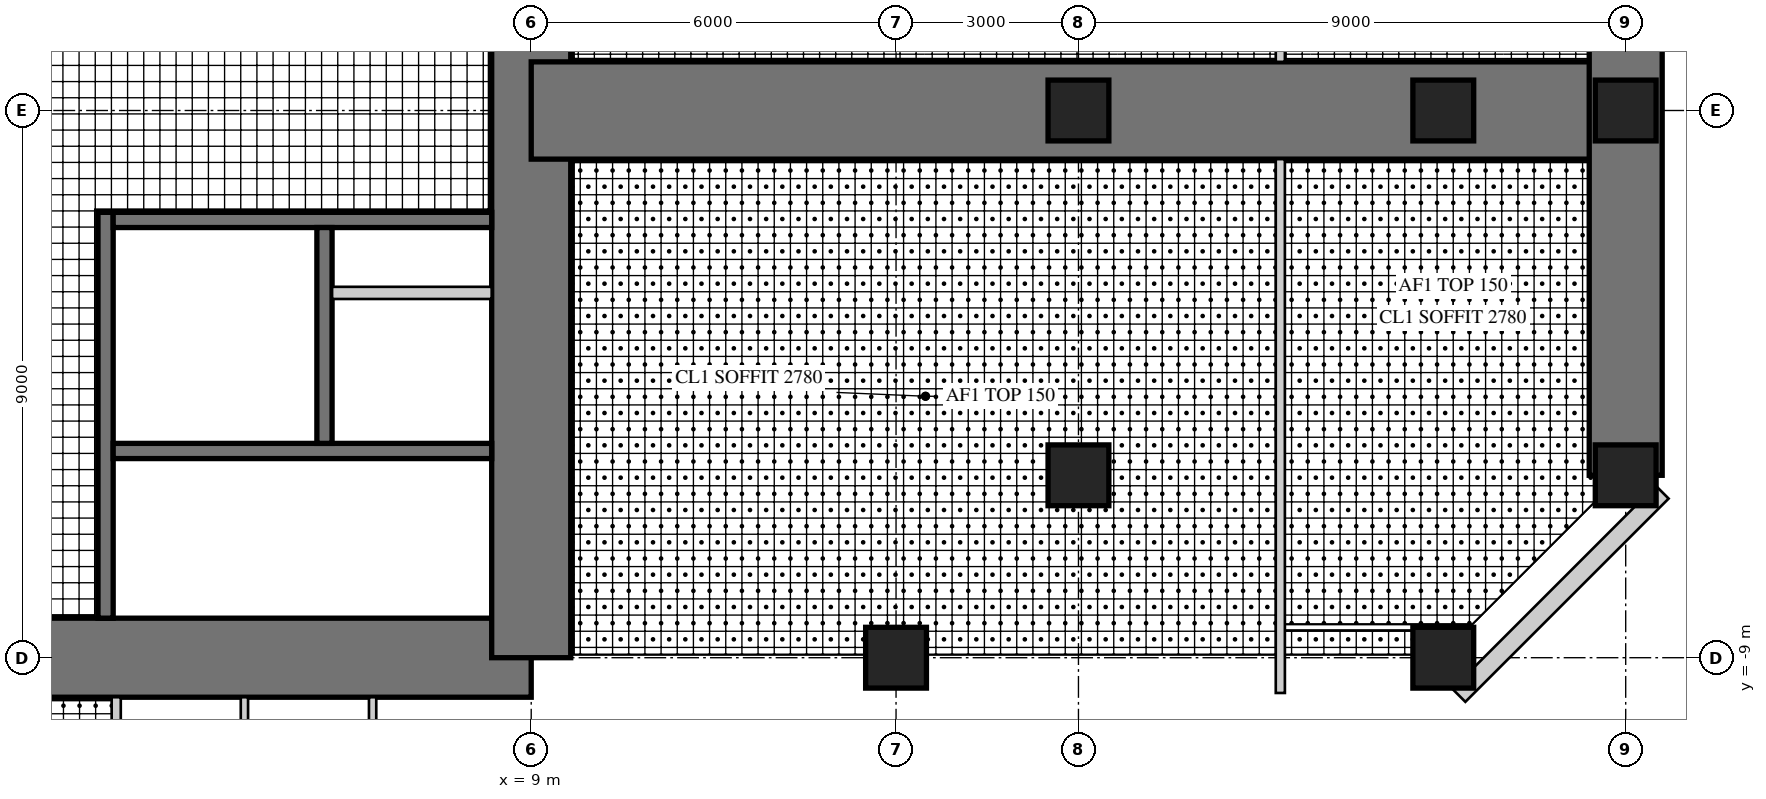
"""IFC4 building model, lengths in metres.
Left out: names, types, materials, properties, quantities, classifications, styles, units other than length and angle.
Written with IfcOpenShell. Run it as: python <this file> out.ifc"""

import sys

from ifc_helpers import new_model, si_unit, direction, frame, frame_2d, origin, origin_2d, place, context, subcontext, project, spatial, rectangle, hollow_rectangle, extrude, element, fill, save


model = new_model("IFC4")
c1 = context("Model", 3, precision=1e-05, world=origin(), true_north=direction((0.0, 1.0)))
c2 = subcontext(c1, "Body", "Model", "MODEL_VIEW")
j1 = project(units=[si_unit("LENGTHUNIT", "METRE"), si_unit("PLANEANGLEUNIT", "RADIAN")], contexts=[c1])
p1 = place(None, origin())
s1 = spatial("IfcSite", under=j1, at=p1, CompositionType="ELEMENT")
p2 = place(p1, origin())
s2 = spatial("IfcBuilding", under=s1, at=p2, CompositionType="ELEMENT")
p3 = place(p2, frame((0.0, 0.0, 144.5)))
s3 = spatial("IfcBuildingStorey", under=s2, at=p3, CompositionType="ELEMENT", Elevation=144.5)
p4 = place(p3, frame((-9.0, -9.0, 0.0), z_axis=(0.0, 0.0, 1.0), x_axis=(1.0, 0.0, 0.0)))
e1 = element("IfcWall", 1, at=p4, inside=s3, PredefinedType="SHEAR", context=c2, shape_type="SweptSolid", body=[
    extrude(rectangle(XDim=18.0, YDim=1.3, at=frame_2d((9.0, 0.0))), origin(), (0.0, 0.0, 1.0), 4.0),
])
p5 = place(p4, frame((9.8, 0.0, 0.0)))
e2 = element("IfcOpeningElement", 2, at=p5, cuts=e1, PredefinedType="OPENING", context=c2, shape_type="SweptSolid", body=[
    extrude(rectangle(XDim=1.0, YDim=2.4, at=frame_2d((0.5, 1.2))), frame((0.0, 0.66, 0.0), z_axis=(0.0, -1.0, 0.0), x_axis=(1.0, 0.0, 0.0)), (0.0, 0.0, 1.0), 1.32),
])
p6 = place(p3, frame((9.0, -9.0, 0.0), z_axis=(0.0, 0.0, 1.0), x_axis=(0.0, 1.0, 0.0)))
e3 = element("IfcWall", 3, at=p6, inside=s3, PredefinedType="SHEAR", context=c2, shape_type="SweptSolid", body=[
    extrude(rectangle(XDim=18.0, YDim=1.3, at=frame_2d((9.0, 0.0))), origin(), (0.0, 0.0, 1.0), 4.0),
])
p7 = place(p6, frame((9.8, 0.0, 0.0)))
e4 = element("IfcOpeningElement", 4, at=p7, cuts=e3, PredefinedType="OPENING", context=c2, shape_type="SweptSolid", body=[
    extrude(rectangle(XDim=1.0, YDim=2.4, at=frame_2d((0.5, 1.2))), frame((0.0, 0.66, 0.0), z_axis=(0.0, -1.0, 0.0), x_axis=(1.0, 0.0, 0.0)), (0.0, 0.0, 1.0), 1.32),
])
p8 = place(p3, frame((2.0, -1.675, 0.0), z_axis=(0.0, 0.0, 1.0), x_axis=(0.0, -1.0, 0.0)))
e5 = element("IfcWall", 5, at=p8, inside=s3, PredefinedType="SHEAR", context=c2, shape_type="SweptSolid", body=[
    extrude(rectangle(XDim=6.675, YDim=0.25, at=frame_2d((3.337, 0.0))), origin(), (0.0, 0.0, 1.0), 4.0),
])
p9 = place(p8, frame((0.725, 0.0, 0.0)))
e6 = element("IfcOpeningElement", 6, at=p9, cuts=e5, PredefinedType="OPENING", context=c2, shape_type="SweptSolid", body=[
    extrude(rectangle(XDim=1.0, YDim=2.1, at=frame_2d((0.5, 1.05))), frame((0.0, 0.135, 0.0), z_axis=(0.0, -1.0, 0.0), x_axis=(1.0, 0.0, 0.0)), (0.0, 0.0, 1.0), 0.27),
])
p10 = place(p3, frame((2.125, -1.8, 0.0), z_axis=(0.0, 0.0, 1.0), x_axis=(1.0, 0.0, 0.0)))
e7 = element("IfcWall", 7, at=p10, inside=s3, PredefinedType="SHEAR", context=c2, shape_type="SweptSolid", body=[
    extrude(rectangle(XDim=6.225, YDim=0.25, at=frame_2d((3.113, 0.0))), origin(), (0.0, 0.0, 1.0), 4.0),
])
p11 = place(p3, frame((2.125, -5.6, 0.0), z_axis=(0.0, 0.0, 1.0), x_axis=(1.0, 0.0, 0.0)))
e8 = element("IfcWall", 8, at=p11, inside=s3, PredefinedType="SHEAR", context=c2, shape_type="SweptSolid", body=[
    extrude(rectangle(XDim=6.225, YDim=0.25, at=frame_2d((3.113, 0.0))), origin(), (0.0, 0.0, 1.0), 4.0),
])
p12 = place(p11, frame((0.175, 0.0, 0.0)))
e9 = element("IfcOpeningElement", 9, at=p12, cuts=e8, PredefinedType="OPENING", context=c2, shape_type="SweptSolid", body=[
    extrude(rectangle(XDim=1.0, YDim=2.1, at=frame_2d((0.5, 1.05))), frame((0.0, 0.135, 0.0), z_axis=(0.0, -1.0, 0.0), x_axis=(1.0, 0.0, 0.0)), (0.0, 0.0, 1.0), 0.27),
])
p13 = place(p3, frame((5.6, -1.925, 0.0), z_axis=(0.0, 0.0, 1.0), x_axis=(0.0, -1.0, 0.0)))
e10 = element("IfcWall", 10, at=p13, inside=s3, PredefinedType="SHEAR", context=c2, shape_type="SweptSolid", body=[
    extrude(rectangle(XDim=3.55, YDim=0.25, at=frame_2d((1.775, 0.0))), origin(), (0.0, 0.0, 1.0), 4.0),
])
p14 = place(p13, frame((1.525, 0.0, 0.0)))
e11 = element("IfcOpeningElement", 11, at=p14, cuts=e10, PredefinedType="OPENING", context=c2, shape_type="SweptSolid", body=[
    extrude(rectangle(XDim=1.1, YDim=2.2, at=frame_2d((0.55, 1.1))), frame((0.0, 0.135, 0.0), z_axis=(0.0, -1.0, 0.0), x_axis=(1.0, 0.0, 0.0)), (0.0, 0.0, 1.0), 0.27),
])
p15 = place(p13, frame((0.075, 0.0, 0.0)))
e12 = element("IfcOpeningElement", 12, at=p15, cuts=e10, PredefinedType="OPENING", context=c2, shape_type="SweptSolid", body=[
    extrude(rectangle(XDim=0.8, YDim=2.1, at=frame_2d((0.4, 1.05))), frame((0.0, 0.135, 0.0), z_axis=(0.0, -1.0, 0.0), x_axis=(1.0, 0.0, 0.0)), (0.0, 0.0, 1.0), 0.27),
])
p16 = place(p3, frame((5.725, -3.0, 0.0), z_axis=(0.0, 0.0, 1.0), x_axis=(1.0, 0.0, 0.0)))
e13 = element("IfcWall", 13, at=p16, inside=s3, PredefinedType="PARTITIONING", context=c2, shape_type="SweptSolid", body=[
    extrude(rectangle(XDim=2.625, YDim=0.2, at=frame_2d((1.312, 0.0))), origin(), (0.0, 0.0, 1.0), 4.0),
])
p17 = place(p3, frame((9.0, 0.0, 0.0), z_axis=(0.0, 0.0, 1.0), x_axis=(1.0, 0.0, 0.0)))
e14 = element("IfcWall", 14, at=p17, inside=s3, PredefinedType="SHEAR", context=c2, shape_type="SweptSolid", body=[
    extrude(rectangle(XDim=18.0, YDim=1.6, at=frame_2d((9.0, 0.0))), origin(), (0.0, 0.0, 1.0), 4.0),
])
p18 = place(p17, frame((9.8, 0.0, 0.0)))
e15 = element("IfcOpeningElement", 15, at=p18, cuts=e14, PredefinedType="OPENING", context=c2, shape_type="SweptSolid", body=[
    extrude(rectangle(XDim=1.0, YDim=2.2, at=frame_2d((0.5, 1.1))), frame((0.0, 0.81, 0.0), z_axis=(0.0, -1.0, 0.0), x_axis=(1.0, 0.0, 0.0)), (0.0, 0.0, 1.0), 1.62),
])
p19 = place(p3, frame((27.0, -6.0, 0.0), z_axis=(0.0, 0.0, 1.0), x_axis=(0.0, 1.0, 0.0)))
e16 = element("IfcWall", 16, at=p19, inside=s3, PredefinedType="SHEAR", context=c2, shape_type="SweptSolid", body=[
    extrude(rectangle(XDim=12.0, YDim=1.2, at=frame_2d((6.0, 0.0))), origin(), (0.0, 0.0, 1.0), 4.0),
])
p20 = place(p19, frame((1.45, 0.0, 0.6)))
e17 = element("IfcOpeningElement", 17, at=p20, cuts=e16, PredefinedType="OPENING", context=c2, shape_type="SweptSolid", body=[
    extrude(rectangle(XDim=3.0, YDim=2.4, at=frame_2d((1.5, 1.2))), frame((0.0, 0.61, 0.0), z_axis=(0.0, -1.0, 0.0), x_axis=(1.0, 0.0, 0.0)), (0.0, 0.0, 1.0), 1.22),
])
p21 = place(p19, frame((7.55, 0.0, 0.6)))
e18 = element("IfcOpeningElement", 18, at=p21, cuts=e16, PredefinedType="OPENING", context=c2, shape_type="SweptSolid", body=[
    extrude(rectangle(XDim=3.0, YDim=2.4, at=frame_2d((1.5, 1.2))), frame((0.0, 0.61, 0.0), z_axis=(0.0, -1.0, 0.0), x_axis=(1.0, 0.0, 0.0)), (0.0, 0.0, 1.0), 1.22),
])
for number, where, z_axis, x_axis in (
    (19, (15.0, -9.0, 0.0), (0.0, 0.0, 1.0), (1.0, 0.0, 0.0)),
    (20, (24.0, -9.0, 0.0), (0.0, 0.0, 1.0), (1.0, 0.0, 0.0)),
    (21, (27.0, -6.0, 0.0), (0.0, 0.0, 1.0), (1.0, 0.0, 0.0)),
    (22, (27.0, 0.0, 0.0), (0.0, 0.0, 1.0), (1.0, 0.0, 0.0)),
    (23, (18.0, -6.0, 0.0), (0.0, 0.0, 1.0), (1.0, 0.0, 0.0)),
    (24, (18.0, 0.0, 0.0), (0.0, 0.0, 1.0), (1.0, 0.0, 0.0)),
    (25, (24.0, 0.0, 0.0), (0.0, 0.0, 1.0), (1.0, 0.0, 0.0)),
):
    element("IfcColumn", number, at=place(p3, frame(where, z_axis=z_axis, x_axis=x_axis)), inside=s3, PredefinedType="COLUMN", context=c2, shape_type="SweptSolid", body=[
        extrude(rectangle(XDim=1.0, YDim=1.0, at=origin_2d()), origin(), (0.0, 0.0, 1.0), 4.0),
    ])
p22 = place(p3, frame((24.257, -9.62, 0.0), z_axis=(0.0, 0.0, 1.0), x_axis=(0.707106781187, 0.707106781187, 0.0)))
e26 = element("IfcWall", 26, at=p22, inside=s3, PredefinedType="SOLIDWALL", context=c2, shape_type="SweptSolid", body=[
    extrude(rectangle(XDim=4.728, YDim=0.3, at=frame_2d((2.364, 0.0))), origin(), (0.0, 0.0, 1.0), 3.8),
])
p23 = place(p22, frame((1.914, 0.0, 0.3)))
e27 = element("IfcOpeningElement", 27, at=p23, cuts=e26, PredefinedType="OPENING", context=c2, shape_type="SweptSolid", body=[
    extrude(rectangle(XDim=0.9, YDim=2.4, at=frame_2d((0.45, 1.2))), frame((0.0, 0.16, 0.0), z_axis=(0.0, -1.0, 0.0), x_axis=(1.0, 0.0, 0.0)), (0.0, 0.0, 1.0), 0.32),
])
p24 = place(p3, frame((21.32, 0.8, 0.0), z_axis=(0.0, 0.0, 1.0), x_axis=(0.0, 1.0, 0.0)))
e28 = element("IfcWall", 28, at=p24, inside=s3, PredefinedType="PARTITIONING", context=c2, shape_type="SweptSolid", body=[
    extrude(rectangle(XDim=8.78, YDim=0.15, at=frame_2d((4.39, 0.0))), origin(), (0.0, 0.0, 1.0), 3.8),
])
p25 = place(p24, frame((0.45, 0.0, 0.0)))
e29 = element("IfcOpeningElement", 29, at=p25, cuts=e28, PredefinedType="OPENING", context=c2, shape_type="SweptSolid", body=[
    extrude(rectangle(XDim=1.0, YDim=2.2, at=frame_2d((0.5, 1.1))), frame((0.0, 0.085, 0.0), z_axis=(0.0, -1.0, 0.0), x_axis=(1.0, 0.0, 0.0)), (0.0, 0.0, 1.0), 0.17),
])
p26 = place(p3, frame((21.32, -9.58, 0.0), z_axis=(0.0, 0.0, 1.0), x_axis=(0.0, 1.0, 0.0)))
e30 = element("IfcWall", 30, at=p26, inside=s3, PredefinedType="PARTITIONING", context=c2, shape_type="SweptSolid", body=[
    extrude(rectangle(XDim=8.78, YDim=0.15, at=frame_2d((4.39, 0.0))), origin(), (0.0, 0.0, 1.0), 3.8),
])
p27 = place(p26, frame((7.33, 0.0, 0.0)))
e31 = element("IfcOpeningElement", 31, at=p27, cuts=e30, PredefinedType="OPENING", context=c2, shape_type="SweptSolid", body=[
    extrude(rectangle(XDim=1.0, YDim=2.2, at=frame_2d((0.5, 1.1))), frame((0.0, 0.085, 0.0), z_axis=(0.0, -1.0, 0.0), x_axis=(1.0, 0.0, 0.0)), (0.0, 0.0, 1.0), 0.17),
])
p28 = place(p3, frame((2.175, -9.65, 0.0), z_axis=(0.0, 0.0, 1.0), x_axis=(0.0, -1.0, 0.0)))
e32 = element("IfcWall", 32, at=p28, inside=s3, PredefinedType="PARTITIONING", context=c2, shape_type="SweptSolid", body=[
    extrude(rectangle(XDim=5.35, YDim=0.15, at=frame_2d((2.675, 0.0))), origin(), (0.0, 0.0, 1.0), 3.8),
])
for number, where, z_axis, x_axis in (
    (33, (4.283, -9.65, 0.0), (0.0, 0.0, 1.0), (0.0, -1.0, 0.0)),
    (34, (6.392, -9.65, 0.0), (0.0, 0.0, 1.0), (0.0, -1.0, 0.0)),
):
    element("IfcWall", number, at=place(p3, frame(where, z_axis=z_axis, x_axis=x_axis)), inside=s3, PredefinedType="PLUMBINGWALL", context=c2, shape_type="SweptSolid", body=[
        extrude(rectangle(XDim=5.25, YDim=0.12, at=frame_2d((2.625, 0.0))), origin(), (0.0, 0.0, 1.0), 3.8),
    ])
p29 = place(p23, origin())
e35 = element("IfcWindow", 35, at=p29, inside=s3, PartitioningType="SINGLE_PANEL", PredefinedType="WINDOW", context=c2, shape_type="SweptSolid", body=[
    extrude(hollow_rectangle(XDim=0.9, YDim=2.4, WallThickness=0.06, at=frame_2d((0.45, 1.2))), frame((0.0, 0.03, 0.0), z_axis=(0.0, -1.0, 0.0), x_axis=(1.0, 0.0, 0.0)), (0.0, 0.0, 1.0), 0.06),
    extrude(rectangle(XDim=0.779, YDim=2.279, at=frame_2d((0.45, 1.2))), frame((0.0, 0.03, 0.0), z_axis=(0.0, -1.0, 0.0), x_axis=(1.0, 0.0, 0.0)), (0.0, 0.0, 1.0), 0.06),
])
fill(e27, e35)
p30 = place(p20, origin())
e36 = element("IfcWindow", 36, at=p30, inside=s3, PartitioningType="SINGLE_PANEL", PredefinedType="WINDOW", context=c2, shape_type="SweptSolid", body=[
    extrude(hollow_rectangle(XDim=3.0, YDim=2.4, WallThickness=0.06, at=frame_2d((1.5, 1.2))), frame((0.0, 0.03, 0.0), z_axis=(0.0, -1.0, 0.0), x_axis=(1.0, 0.0, 0.0)), (0.0, 0.0, 1.0), 0.06),
    extrude(rectangle(XDim=2.879, YDim=2.279, at=frame_2d((1.5, 1.2))), frame((0.0, 0.03, 0.0), z_axis=(0.0, -1.0, 0.0), x_axis=(1.0, 0.0, 0.0)), (0.0, 0.0, 1.0), 0.06),
])
fill(e17, e36)
p31 = place(p27, frame((1.0, 0.0, 0.0), z_axis=(0.0, 0.0, 1.0), x_axis=(-1.0, 0.0, 0.0)))
e37 = element("IfcDoor", 37, at=p31, inside=s3, OperationType="SINGLE_SWING_LEFT", PredefinedType="DOOR", context=c2, shape_type="SweptSolid", body=[
    extrude(rectangle(XDim=1.0, YDim=2.2, at=frame_2d((0.5, 1.1))), frame((0.0, 0.025, 0.0), z_axis=(0.0, -1.0, 0.0), x_axis=(1.0, 0.0, 0.0)), (0.0, 0.0, 1.0), 0.05),
])
fill(e31, e37)
p32 = place(p18, origin())
e38 = element("IfcDoor", 38, at=p32, inside=s3, OperationType="SINGLE_SWING_RIGHT", PredefinedType="DOOR", context=c2, shape_type="SweptSolid", body=[
    extrude(rectangle(XDim=1.0, YDim=2.2, at=frame_2d((0.5, 1.1))), frame((0.0, 0.025, 0.0), z_axis=(0.0, -1.0, 0.0), x_axis=(1.0, 0.0, 0.0)), (0.0, 0.0, 1.0), 0.05),
])
fill(e15, e38)
p33 = place(p5, frame((1.0, 0.0, 0.0), z_axis=(0.0, 0.0, 1.0), x_axis=(-1.0, 0.0, 0.0)))
e39 = element("IfcDoor", 39, at=p33, inside=s3, OperationType="SINGLE_SWING_RIGHT", PredefinedType="DOOR", context=c2, shape_type="SweptSolid", body=[
    extrude(rectangle(XDim=1.0, YDim=2.4, at=frame_2d((0.5, 1.2))), frame((0.0, -0.005, 0.0), z_axis=(0.0, -1.0, 0.0), x_axis=(1.0, 0.0, 0.0)), (0.0, 0.0, 1.0), 0.05),
])
fill(e2, e39)
p34 = place(p7, frame((1.0, 0.0, 0.0), z_axis=(0.0, 0.0, 1.0), x_axis=(-1.0, 0.0, 0.0)))
e40 = element("IfcDoor", 40, at=p34, inside=s3, OperationType="SINGLE_SWING_RIGHT", PredefinedType="DOOR", context=c2, shape_type="SweptSolid", body=[
    extrude(rectangle(XDim=1.0, YDim=2.4, at=frame_2d((0.5, 1.2))), frame((0.0, -0.005, 0.0), z_axis=(0.0, -1.0, 0.0), x_axis=(1.0, 0.0, 0.0)), (0.0, 0.0, 1.0), 0.05),
])
fill(e4, e40)
p35 = place(p9, origin())
e41 = element("IfcDoor", 41, at=p35, inside=s3, OperationType="SINGLE_SWING_LEFT", PredefinedType="DOOR", context=c2, shape_type="SweptSolid", body=[
    extrude(rectangle(XDim=1.0, YDim=2.1, at=frame_2d((0.5, 1.05))), frame((0.0, 0.025, 0.0), z_axis=(0.0, -1.0, 0.0), x_axis=(1.0, 0.0, 0.0)), (0.0, 0.0, 1.0), 0.05),
])
fill(e6, e41)
p36 = place(p12, frame((1.0, 0.0, 0.0), z_axis=(0.0, 0.0, 1.0), x_axis=(-1.0, 0.0, 0.0)))
e42 = element("IfcDoor", 42, at=p36, inside=s3, OperationType="SINGLE_SWING_RIGHT", PredefinedType="DOOR", context=c2, shape_type="SweptSolid", body=[
    extrude(rectangle(XDim=1.0, YDim=2.1, at=frame_2d((0.5, 1.05))), frame((0.0, 0.025, 0.0), z_axis=(0.0, -1.0, 0.0), x_axis=(1.0, 0.0, 0.0)), (0.0, 0.0, 1.0), 0.05),
])
fill(e9, e42)
p37 = place(p14, origin())
e43 = element("IfcDoor", 43, at=p37, inside=s3, OperationType="DOUBLE_DOOR_SLIDING", PredefinedType="DOOR", context=c2, shape_type="SweptSolid", body=[
    extrude(rectangle(XDim=1.1, YDim=2.2, at=frame_2d((0.55, 1.1))), frame((0.0, 0.025, 0.0), z_axis=(0.0, -1.0, 0.0), x_axis=(1.0, 0.0, 0.0)), (0.0, 0.0, 1.0), 0.05),
])
fill(e11, e43)
p38 = place(p15, origin())
e44 = element("IfcDoor", 44, at=p38, inside=s3, OperationType="SINGLE_SWING_LEFT", PredefinedType="DOOR", context=c2, shape_type="SweptSolid", body=[
    extrude(rectangle(XDim=0.8, YDim=2.1, at=frame_2d((0.4, 1.05))), frame((0.0, 0.025, 0.0), z_axis=(0.0, -1.0, 0.0), x_axis=(1.0, 0.0, 0.0)), (0.0, 0.0, 1.0), 0.05),
])
fill(e12, e44)
save(model, sys.argv[1])
